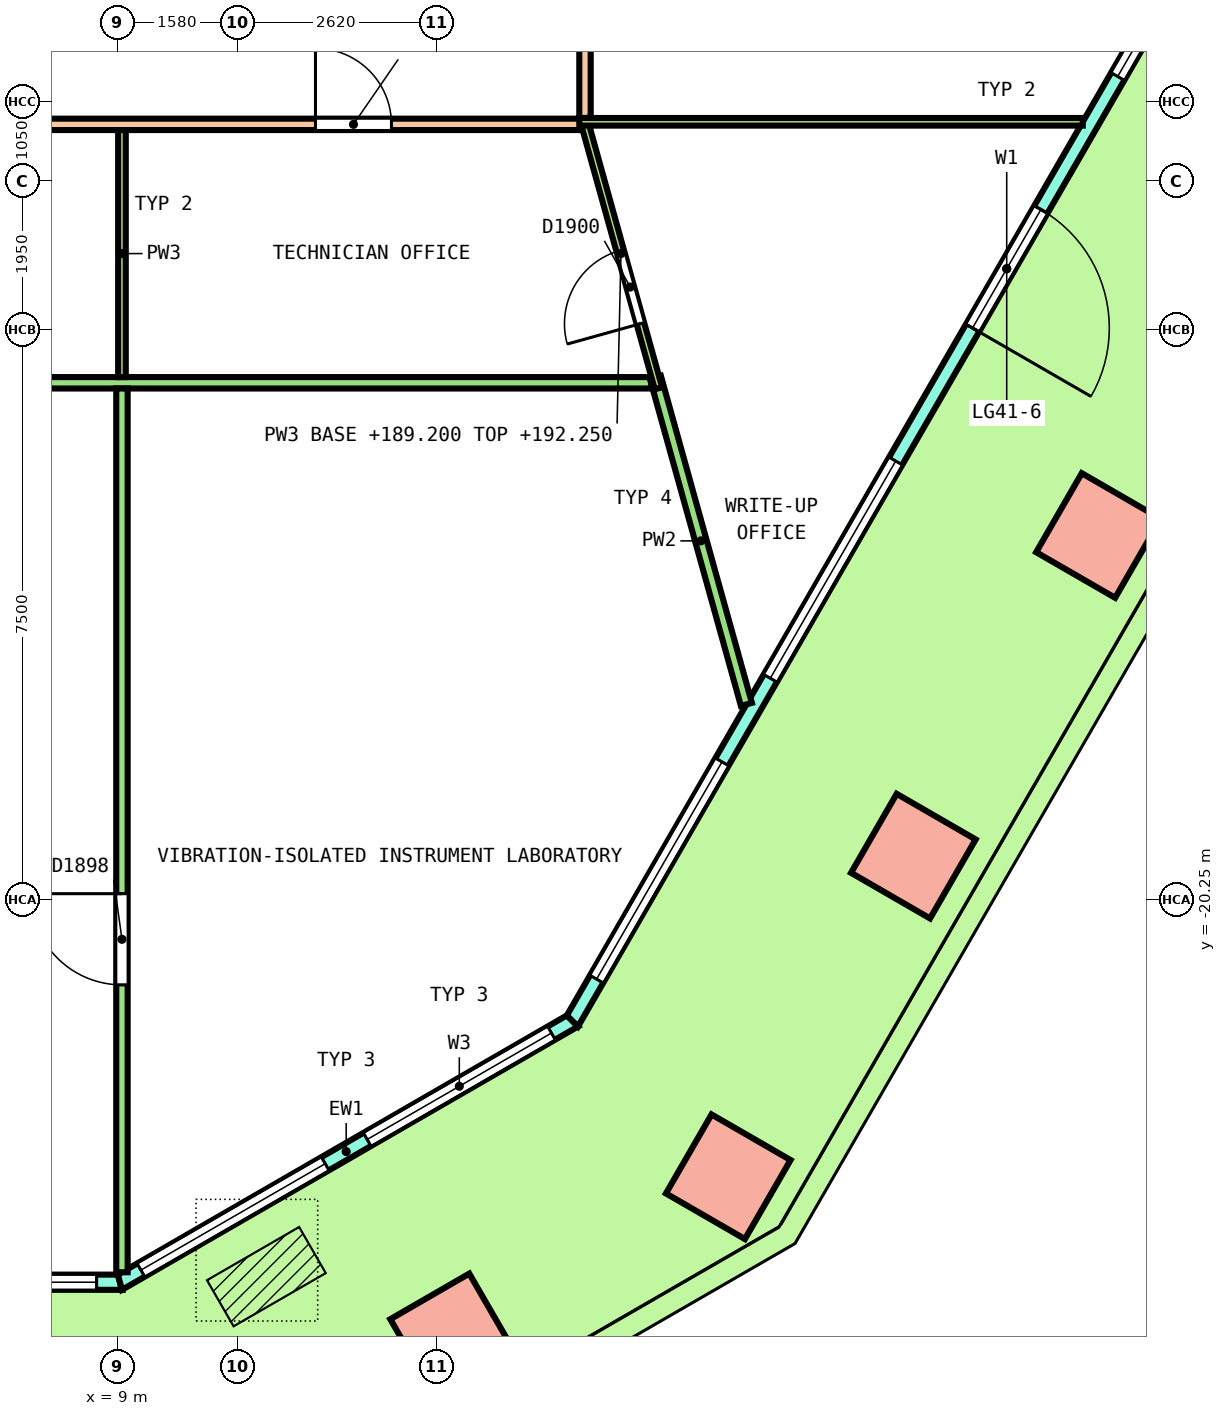
"""IFC4 building model, lengths in metres.
Left out: names, types, materials, properties, quantities, classifications, styles, units other than length and angle.
Written with IfcOpenShell. Run it as: python <this file> out.ifc"""

import sys

from ifc_helpers import new_model, si_unit, direction, frame, frame_2d, origin, origin_2d, place, context, subcontext, project, spatial, polyline, rectangle, outline, extrude, element, fill, save


model = new_model("IFC4")
c1 = context("Model", 3, precision=1e-05, world=origin(), true_north=direction((0.0, 1.0)))
c2 = subcontext(c1, "Body", "Model", "MODEL_VIEW")
j1 = project(units=[si_unit("LENGTHUNIT", "METRE"), si_unit("PLANEANGLEUNIT", "RADIAN")], contexts=[c1])
p1 = place(None, origin())
s1 = spatial("IfcSite", under=j1, at=p1, CompositionType="ELEMENT")
p2 = place(p1, origin())
s2 = spatial("IfcBuilding", under=s1, at=p2, CompositionType="ELEMENT")
p3 = place(p2, frame((0.0, 0.0, 189.2)))
s3 = spatial("IfcBuildingStorey", under=s2, at=p3, CompositionType="ELEMENT", Elevation=189.2)
for number, where, z_axis, x_axis in (
    (1, (13.408, -25.989, 0.0), (0.0, 0.0, 1.0), (0.866, 0.5, 0.0)),
    (2, (17.035, -23.895, 0.0), (0.0, 0.0, 1.0), (0.5, 0.866, 0.0)),
    (3, (19.47, -19.677, 0.0), (0.0, 0.0, 1.0), (0.5, 0.866, 0.0)),
    (4, (21.905, -15.459, 0.0), (0.0, 0.0, 1.0), (0.5, 0.866, 0.0)),
):
    element("IfcColumn", number, at=place(p3, frame(where, z_axis=z_axis, x_axis=x_axis)), inside=s3, PredefinedType="COLUMN", context=c2, shape_type="SweptSolid", body=[
        extrude(rectangle(XDim=1.2, YDim=1.2, at=origin_2d()), origin(), (0.0, 0.0, 1.0), 4.05),
    ])
p4 = place(p3, frame((-9.031, -25.283, 0.0), z_axis=(0.0, 0.0, 1.0), x_axis=(1.0, 0.0, 0.0)))
e5 = element("IfcWall", 5, at=p4, inside=s3, PredefinedType="SOLIDWALL", context=c2, shape_type="SweptSolid", body=[
    extrude(outline(polyline([(-0.027, -0.1), (0.979, -0.1), (1.986, -0.1), (2.992, -0.1), (3.999, -0.1), (5.005, -0.1), (6.012, -0.1), (7.018, -0.1), (8.025, -0.1), (9.031, -0.1), (10.038, -0.1), (11.044, -0.1), (12.051, -0.1), (13.057, -0.1), (14.063, -0.1), (15.07, -0.1), (16.076, -0.1), (17.083, -0.1), (18.089, -0.1), (18.036, 0.1), (17.035, 0.1), (16.035, 0.1), (15.034, 0.1), (14.034, 0.1), (13.033, 0.1), (12.033, 0.1), (11.032, 0.1), (10.032, 0.1), (9.031, 0.1), (8.031, 0.1), (7.03, 0.1), (6.03, 0.1), (5.029, 0.1), (4.029, 0.1), (3.028, 0.1), (2.028, 0.1), (1.027, 0.1), (0.027, 0.1), (-0.027, -0.1)])), origin(), (0.0, 0.0, 1.0), 4.1),
])
p5 = place(p4, frame((0.306, 0.0, 0.1)))
e6 = element("IfcOpeningElement", 6, at=p5, cuts=e5, PredefinedType="OPENING", context=c2, shape_type="SweptSolid", body=[
    extrude(rectangle(XDim=3.0, YDim=2.9, at=frame_2d((1.5, 1.45))), frame((0.0, 0.11, 0.0), z_axis=(0.0, -1.0, 0.0), x_axis=(1.0, 0.0, 0.0)), (0.0, 0.0, 1.0), 0.22),
])
p6 = place(p4, frame((3.919, 0.0, 0.1)))
e7 = element("IfcOpeningElement", 7, at=p6, cuts=e5, PredefinedType="OPENING", context=c2, shape_type="SweptSolid", body=[
    extrude(rectangle(XDim=3.0, YDim=2.9, at=frame_2d((1.5, 1.45))), frame((0.0, 0.11, 0.0), z_axis=(0.0, -1.0, 0.0), x_axis=(1.0, 0.0, 0.0)), (0.0, 0.0, 1.0), 0.22),
])
p7 = place(p4, frame((8.131, 0.0, 0.0)))
e8 = element("IfcOpeningElement", 8, at=p7, cuts=e5, PredefinedType="OPENING", context=c2, shape_type="SweptSolid", body=[
    extrude(rectangle(XDim=1.8, YDim=2.4, at=frame_2d((0.9, 1.2))), frame((0.0, 0.11, 0.0), z_axis=(0.0, -1.0, 0.0), x_axis=(1.0, 0.0, 0.0)), (0.0, 0.0, 1.0), 0.22),
])
p8 = place(p4, frame((8.131, 0.0, 2.55)))
e9 = element("IfcOpeningElement", 9, at=p8, cuts=e5, PredefinedType="OPENING", context=c2, shape_type="SweptSolid", body=[
    extrude(rectangle(XDim=1.8, YDim=0.45, at=frame_2d((0.9, 0.225))), frame((0.0, 0.11, 0.0), z_axis=(0.0, -1.0, 0.0), x_axis=(1.0, 0.0, 0.0)), (0.0, 0.0, 1.0), 0.22),
])
p9 = place(p4, frame((11.144, 0.0, 0.1)))
e10 = element("IfcOpeningElement", 10, at=p9, cuts=e5, PredefinedType="OPENING", context=c2, shape_type="SweptSolid", body=[
    extrude(rectangle(XDim=3.0, YDim=2.9, at=frame_2d((1.5, 1.45))), frame((0.0, 0.11, 0.0), z_axis=(0.0, -1.0, 0.0), x_axis=(1.0, 0.0, 0.0)), (0.0, 0.0, 1.0), 0.22),
])
p10 = place(p4, frame((14.756, 0.0, 0.1)))
e11 = element("IfcOpeningElement", 11, at=p10, cuts=e5, PredefinedType="OPENING", context=c2, shape_type="SweptSolid", body=[
    extrude(rectangle(XDim=3.0, YDim=2.9, at=frame_2d((1.5, 1.45))), frame((0.0, 0.11, 0.0), z_axis=(0.0, -1.0, 0.0), x_axis=(1.0, 0.0, 0.0)), (0.0, 0.0, 1.0), 0.22),
])
p11 = place(p3, frame((9.031, -25.283, 0.0), z_axis=(0.0, 0.0, 1.0), x_axis=(0.866029458321, 0.49999297727, 0.0)))
e12 = element("IfcWall", 12, at=p11, inside=s3, PredefinedType="SOLIDWALL", context=c2, shape_type="SweptSolid", body=[
    extrude(outline(polyline([(-0.027, -0.1), (1.128, -0.1), (2.282, -0.1), (3.437, -0.1), (4.592, -0.1), (5.747, -0.1), (6.901, -0.1), (6.848, 0.1), (5.711, 0.1), (4.574, 0.1), (3.437, 0.1), (2.301, 0.1), (1.164, 0.1), (0.027, 0.1), (-0.027, -0.1)])), origin(), (0.0, 0.0, 1.0), 4.1),
])
p12 = place(p11, frame((0.319, 0.0, 0.1)))
e13 = element("IfcOpeningElement", 13, at=p12, cuts=e12, PredefinedType="OPENING", context=c2, shape_type="SweptSolid", body=[
    extrude(rectangle(XDim=2.8, YDim=2.9, at=frame_2d((1.4, 1.45))), frame((0.0, 0.11, 0.0), z_axis=(0.0, -1.0, 0.0), x_axis=(1.0, 0.0, 0.0)), (0.0, 0.0, 1.0), 0.22),
])
p13 = place(p11, frame((3.756, 0.0, 0.1)))
e14 = element("IfcOpeningElement", 14, at=p13, cuts=e12, PredefinedType="OPENING", context=c2, shape_type="SweptSolid", body=[
    extrude(rectangle(XDim=2.8, YDim=2.9, at=frame_2d((1.4, 1.45))), frame((0.0, 0.11, 0.0), z_axis=(0.0, -1.0, 0.0), x_axis=(1.0, 0.0, 0.0)), (0.0, 0.0, 1.0), 0.22),
])
p14 = place(p3, frame((14.985, -21.845, 0.0), z_axis=(0.0, 0.0, 1.0), x_axis=(0.50000204422, 0.86602422355, 0.0)))
e15 = element("IfcWall", 15, at=p14, inside=s3, PredefinedType="SOLIDWALL", context=c2, shape_type="SweptSolid", body=[
    extrude(outline(polyline([(-0.027, -0.1), (1.014, -0.1), (2.055, -0.1), (3.097, -0.1), (4.138, -0.1), (5.179, -0.1), (6.22, -0.1), (7.261, -0.1), (8.303, -0.1), (9.344, -0.1), (10.385, -0.1), (11.426, -0.1), (12.468, -0.1), (13.509, -0.1), (14.55, -0.1), (15.591, -0.1), (16.632, -0.1), (17.673, -0.1), (18.715, -0.1), (19.756, -0.1), (20.797, -0.1), (21.838, -0.1), (22.879, -0.1), (22.826, 0.1), (21.789, 0.1), (20.753, 0.1), (19.717, 0.1), (18.68, 0.1), (17.644, 0.1), (16.608, 0.1), (15.572, 0.1), (14.535, 0.1), (13.499, 0.1), (12.463, 0.1), (11.426, 0.1), (10.39, 0.1), (9.354, 0.1), (8.317, 0.1), (7.281, 0.1), (6.245, 0.1), (5.208, 0.1), (4.172, 0.1), (3.136, 0.1), (2.099, 0.1), (1.063, 0.1), (0.027, 0.1), (-0.027, -0.1)])), origin(), (0.0, 0.0, 1.0), 4.1),
])
p15 = place(p14, frame((0.635, 0.0, 0.1)))
e16 = element("IfcOpeningElement", 16, at=p15, cuts=e15, PredefinedType="OPENING", context=c2, shape_type="SweptSolid", body=[
    extrude(rectangle(XDim=3.3, YDim=2.9, at=frame_2d((1.65, 1.45))), frame((0.0, 0.11, 0.0), z_axis=(0.0, -1.0, 0.0), x_axis=(1.0, 0.0, 0.0)), (0.0, 0.0, 1.0), 0.22),
])
p16 = place(p14, frame((5.206, 0.0, 0.1)))
e17 = element("IfcOpeningElement", 17, at=p16, cuts=e15, PredefinedType="OPENING", context=c2, shape_type="SweptSolid", body=[
    extrude(rectangle(XDim=3.3, YDim=2.9, at=frame_2d((1.65, 1.45))), frame((0.0, 0.11, 0.0), z_axis=(0.0, -1.0, 0.0), x_axis=(1.0, 0.0, 0.0)), (0.0, 0.0, 1.0), 0.22),
])
p17 = place(p14, frame((10.526, 0.0, 0.0)))
e18 = element("IfcOpeningElement", 18, at=p17, cuts=e15, PredefinedType="OPENING", context=c2, shape_type="SweptSolid", body=[
    extrude(rectangle(XDim=1.8, YDim=2.4, at=frame_2d((0.9, 1.2))), frame((0.0, 0.11, 0.0), z_axis=(0.0, -1.0, 0.0), x_axis=(1.0, 0.0, 0.0)), (0.0, 0.0, 1.0), 0.22),
])
p18 = place(p14, frame((10.526, 0.0, 2.55)))
e19 = element("IfcOpeningElement", 19, at=p18, cuts=e15, PredefinedType="OPENING", context=c2, shape_type="SweptSolid", body=[
    extrude(rectangle(XDim=1.8, YDim=0.45, at=frame_2d((0.9, 0.225))), frame((0.0, 0.11, 0.0), z_axis=(0.0, -1.0, 0.0), x_axis=(1.0, 0.0, 0.0)), (0.0, 0.0, 1.0), 0.22),
])
p19 = place(p14, frame((14.347, 0.0, 0.1)))
e20 = element("IfcOpeningElement", 20, at=p19, cuts=e15, PredefinedType="OPENING", context=c2, shape_type="SweptSolid", body=[
    extrude(rectangle(XDim=3.3, YDim=2.9, at=frame_2d((1.65, 1.45))), frame((0.0, 0.11, 0.0), z_axis=(0.0, -1.0, 0.0), x_axis=(1.0, 0.0, 0.0)), (0.0, 0.0, 1.0), 0.22),
])
p20 = place(p14, frame((18.917, 0.0, 0.1)))
e21 = element("IfcOpeningElement", 21, at=p20, cuts=e15, PredefinedType="OPENING", context=c2, shape_type="SweptSolid", body=[
    extrude(rectangle(XDim=3.3, YDim=2.9, at=frame_2d((1.65, 1.45))), frame((0.0, 0.11, 0.0), z_axis=(0.0, -1.0, 0.0), x_axis=(1.0, 0.0, 0.0)), (0.0, 0.0, 1.0), 0.22),
])
p21 = place(p3, frame((15.15, -9.966, 0.0), z_axis=(0.0, 0.0, 1.0), x_axis=(0.0, 1.0, 0.0)))
e22 = element("IfcWall", 22, at=p21, inside=s3, PredefinedType="PARTITIONING", context=c2, shape_type="SweptSolid", body=[
    extrude(rectangle(XDim=8.692, YDim=0.15, at=frame_2d((4.346, 0.0))), origin(), (0.0, 0.0, 1.0), 3.05),
])
p22 = place(p21, frame((1.434, 0.0, 0.0)))
e23 = element("IfcOpeningElement", 23, at=p22, cuts=e22, PredefinedType="OPENING", context=c2, shape_type="SweptSolid", body=[
    extrude(rectangle(XDim=1.0, YDim=2.1, at=frame_2d((0.5, 1.05))), frame((0.0, 0.085, 0.0), z_axis=(0.0, -1.0, 0.0), x_axis=(1.0, 0.0, 0.0)), (0.0, 0.0, 1.0), 0.17),
])
p23 = place(p3, frame((-15.225, -10.05, 0.0), z_axis=(0.0, 0.0, 1.0), x_axis=(1.0, 0.0, 0.0)))
e24 = element("IfcWall", 24, at=p23, inside=s3, PredefinedType="PARTITIONING", context=c2, shape_type="SweptSolid", body=[
    extrude(rectangle(XDim=30.325, YDim=0.15, at=frame_2d((15.163, 0.0))), origin(), (0.0, 0.0, 1.0), 3.05),
])
p24 = place(p23, frame((3.742, 0.0, 0.0)))
e25 = element("IfcOpeningElement", 25, at=p24, cuts=e24, PredefinedType="OPENING", context=c2, shape_type="SweptSolid", body=[
    extrude(rectangle(XDim=1.0, YDim=2.1, at=frame_2d((0.5, 1.05))), frame((0.0, 0.085, 0.0), z_axis=(0.0, -1.0, 0.0), x_axis=(1.0, 0.0, 0.0)), (0.0, 0.0, 1.0), 0.17),
])
p25 = place(p23, frame((12.193, 0.0, 0.0)))
e26 = element("IfcOpeningElement", 26, at=p25, cuts=e24, PredefinedType="OPENING", context=c2, shape_type="SweptSolid", body=[
    extrude(rectangle(XDim=1.2, YDim=2.1, at=frame_2d((0.6, 1.05))), frame((0.0, 0.085, 0.0), z_axis=(0.0, -1.0, 0.0), x_axis=(1.0, 0.0, 0.0)), (0.0, 0.0, 1.0), 0.17),
])
p26 = place(p23, frame((26.829, 0.0, 0.0)))
e27 = element("IfcOpeningElement", 27, at=p26, cuts=e24, PredefinedType="OPENING", context=c2, shape_type="SweptSolid", body=[
    extrude(rectangle(XDim=1.0, YDim=2.1, at=frame_2d((0.5, 1.05))), frame((0.0, 0.085, 0.0), z_axis=(0.0, -1.0, 0.0), x_axis=(1.0, 0.0, 0.0)), (0.0, 0.0, 1.0), 0.17),
])
p27 = place(p3, frame((-14.983, -13.45, 0.0), z_axis=(0.0, 0.0, 1.0), x_axis=(1.0, 0.0, 0.0)))
e28 = element("IfcWall", 28, at=p27, inside=s3, PredefinedType="PARTITIONING", context=c2, shape_type="SweptSolid", body=[
    extrude(rectangle(XDim=31.004, YDim=0.15, at=frame_2d((15.502, 0.0))), origin(), (0.0, 0.0, 1.0), 3.05),
])
p28 = place(p27, frame((1.3, 0.0, 0.0)))
e29 = element("IfcOpeningElement", 29, at=p28, cuts=e28, PredefinedType="OPENING", context=c2, shape_type="SweptSolid", body=[
    extrude(rectangle(XDim=1.2, YDim=2.1, at=frame_2d((0.6, 1.05))), frame((0.0, 0.085, 0.0), z_axis=(0.0, -1.0, 0.0), x_axis=(1.0, 0.0, 0.0)), (0.0, 0.0, 1.0), 0.17),
])
p29 = place(p3, frame((9.058, -25.152, 0.0), z_axis=(0.0, 0.0, 1.0), x_axis=(0.0, 1.0, 0.0)))
e30 = element("IfcWall", 30, at=p29, inside=s3, PredefinedType="PARTITIONING", context=c2, shape_type="SweptSolid", body=[
    extrude(rectangle(XDim=11.627, YDim=0.15, at=frame_2d((5.813, 0.0))), origin(), (0.0, 0.0, 1.0), 3.05),
])
p30 = place(p29, frame((3.781, 0.0, 0.0)))
e31 = element("IfcOpeningElement", 31, at=p30, cuts=e30, PredefinedType="OPENING", context=c2, shape_type="SweptSolid", body=[
    extrude(rectangle(XDim=1.2, YDim=2.1, at=frame_2d((0.6, 1.05))), frame((0.0, 0.085, 0.0), z_axis=(0.0, -1.0, 0.0), x_axis=(1.0, 0.0, 0.0)), (0.0, 0.0, 1.0), 0.17),
])
p31 = place(p3, frame((16.076, -13.378, 0.0), z_axis=(0.0, 0.0, 1.0), x_axis=(0.268117368294, -0.963386255257, 0.0)))
e32 = element("IfcWall", 32, at=p31, inside=s3, PredefinedType="PARTITIONING", context=c2, shape_type="SweptSolid", body=[
    extrude(rectangle(XDim=4.467, YDim=0.15, at=frame_2d((2.234, 0.0))), origin(), (0.0, 0.0, 1.0), 3.05),
])
p32 = place(p3, frame((9.058, -13.375, 0.0), z_axis=(0.0, 0.0, 1.0), x_axis=(0.0, 1.0, 0.0)))
e33 = element("IfcWall", 33, at=p32, inside=s3, PredefinedType="PARTITIONING", context=c2, shape_type="SweptSolid", body=[
    extrude(rectangle(XDim=3.25, YDim=0.1, at=frame_2d((1.625, 0.0))), origin(), (0.0, 0.0, 1.0), 3.05),
])
p33 = place(p3, frame((15.13, -9.978, 0.0), z_axis=(0.0, 0.0, 1.0), x_axis=(0.268088761136, -0.963394216379, 0.0)))
e34 = element("IfcWall", 34, at=p33, inside=s3, PredefinedType="PARTITIONING", context=c2, shape_type="SweptSolid", body=[
    extrude(rectangle(XDim=3.679, YDim=0.1, at=frame_2d((1.84, 0.0))), origin(), (0.0, 0.0, 1.0), 3.05),
])
p34 = place(p33, frame((1.797, 0.0, 0.0)))
e35 = element("IfcOpeningElement", 35, at=p34, cuts=e34, PredefinedType="OPENING", context=c2, shape_type="SweptSolid", body=[
    extrude(rectangle(XDim=1.0, YDim=2.1, at=frame_2d((0.5, 1.05))), frame((0.0, 0.06, 0.0), z_axis=(0.0, -1.0, 0.0), x_axis=(1.0, 0.0, 0.0)), (0.0, 0.0, 1.0), 0.12),
])
p35 = place(p3, frame((15.075, -10.016, 0.0), z_axis=(0.0, 0.0, 1.0), x_axis=(1.0, 0.0, 0.0)))
e36 = element("IfcWall", 36, at=p35, inside=s3, PredefinedType="PARTITIONING", context=c2, shape_type="SweptSolid", body=[
    extrude(rectangle(XDim=6.624, YDim=0.1, at=frame_2d((3.312, 0.0))), origin(), (0.0, 0.0, 1.0), 3.05),
])
p36 = place(p10, origin())
e37 = element("IfcWindow", 37, at=p36, inside=s3, PartitioningType="SINGLE_PANEL", PredefinedType="WINDOW", context=c2, shape_type="SweptSolid", body=[
    extrude(rectangle(XDim=3.0, YDim=2.9, at=frame_2d((1.5, 1.45))), frame((0.0, 0.03, 0.0), z_axis=(0.0, -1.0, 0.0), x_axis=(1.0, 0.0, 0.0)), (0.0, 0.0, 1.0), 0.06),
])
fill(e11, e37)
p37 = place(p12, origin())
e38 = element("IfcWindow", 38, at=p37, inside=s3, PartitioningType="SINGLE_PANEL", PredefinedType="WINDOW", context=c2, shape_type="SweptSolid", body=[
    extrude(rectangle(XDim=2.8, YDim=2.9, at=frame_2d((1.4, 1.45))), frame((0.0, 0.03, 0.0), z_axis=(0.0, -1.0, 0.0), x_axis=(1.0, 0.0, 0.0)), (0.0, 0.0, 1.0), 0.06),
])
fill(e13, e38)
p38 = place(p13, origin())
e39 = element("IfcWindow", 39, at=p38, inside=s3, PartitioningType="SINGLE_PANEL", PredefinedType="WINDOW", context=c2, shape_type="SweptSolid", body=[
    extrude(rectangle(XDim=2.8, YDim=2.9, at=frame_2d((1.4, 1.45))), frame((0.0, 0.03, 0.0), z_axis=(0.0, -1.0, 0.0), x_axis=(1.0, 0.0, 0.0)), (0.0, 0.0, 1.0), 0.06),
])
fill(e14, e39)
p39 = place(p15, origin())
e40 = element("IfcWindow", 40, at=p39, inside=s3, PartitioningType="SINGLE_PANEL", PredefinedType="WINDOW", context=c2, shape_type="SweptSolid", body=[
    extrude(rectangle(XDim=3.3, YDim=2.9, at=frame_2d((1.65, 1.45))), frame((0.0, 0.03, 0.0), z_axis=(0.0, -1.0, 0.0), x_axis=(1.0, 0.0, 0.0)), (0.0, 0.0, 1.0), 0.06),
])
fill(e16, e40)
p40 = place(p16, origin())
e41 = element("IfcWindow", 41, at=p40, inside=s3, PartitioningType="SINGLE_PANEL", PredefinedType="WINDOW", context=c2, shape_type="SweptSolid", body=[
    extrude(rectangle(XDim=3.3, YDim=2.9, at=frame_2d((1.65, 1.45))), frame((0.0, 0.03, 0.0), z_axis=(0.0, -1.0, 0.0), x_axis=(1.0, 0.0, 0.0)), (0.0, 0.0, 1.0), 0.06),
])
fill(e17, e41)
p41 = place(p17, origin())
e42 = element("IfcDoor", 42, at=p41, inside=s3, OperationType="DOUBLE_DOOR_SINGLE_SWING", PredefinedType="DOOR", context=c2, shape_type="SweptSolid", body=[
    extrude(rectangle(XDim=1.8, YDim=2.4, at=frame_2d((0.9, 1.2))), frame((0.0, 0.025, 0.0), z_axis=(0.0, -1.0, 0.0), x_axis=(1.0, 0.0, 0.0)), (0.0, 0.0, 1.0), 0.05),
])
fill(e18, e42)
p42 = place(p18, origin())
e43 = element("IfcWindow", 43, at=p42, inside=s3, PartitioningType="SINGLE_PANEL", PredefinedType="WINDOW", context=c2, shape_type="SweptSolid", body=[
    extrude(rectangle(XDim=1.8, YDim=0.45, at=frame_2d((0.9, 0.225))), frame((0.0, 0.03, 0.0), z_axis=(0.0, -1.0, 0.0), x_axis=(1.0, 0.0, 0.0)), (0.0, 0.0, 1.0), 0.06),
])
fill(e19, e43)
p43 = place(p19, origin())
e44 = element("IfcWindow", 44, at=p43, inside=s3, PartitioningType="SINGLE_PANEL", PredefinedType="WINDOW", context=c2, shape_type="SweptSolid", body=[
    extrude(rectangle(XDim=3.3, YDim=2.9, at=frame_2d((1.65, 1.45))), frame((0.0, 0.03, 0.0), z_axis=(0.0, -1.0, 0.0), x_axis=(1.0, 0.0, 0.0)), (0.0, 0.0, 1.0), 0.06),
])
fill(e20, e44)
p44 = place(p30, origin())
e45 = element("IfcDoor", 45, at=p44, inside=s3, OperationType="DOUBLE_DOOR_SINGLE_SWING", PredefinedType="DOOR", context=c2, shape_type="SweptSolid", body=[
    extrude(rectangle(XDim=1.2, YDim=2.1, at=frame_2d((0.6, 1.05))), frame((0.0, 0.025, 0.0), z_axis=(0.0, -1.0, 0.0), x_axis=(1.0, 0.0, 0.0)), (0.0, 0.0, 1.0), 0.05),
])
fill(e31, e45)
p45 = place(p26, origin())
e46 = element("IfcDoor", 46, at=p45, inside=s3, OperationType="SINGLE_SWING_LEFT", PredefinedType="DOOR", context=c2, shape_type="SweptSolid", body=[
    extrude(rectangle(XDim=1.0, YDim=2.1, at=frame_2d((0.5, 1.05))), frame((0.0, 0.025, 0.0), z_axis=(0.0, -1.0, 0.0), x_axis=(1.0, 0.0, 0.0)), (0.0, 0.0, 1.0), 0.05),
])
fill(e27, e46)
p46 = place(p34, origin())
e47 = element("IfcDoor", 47, at=p46, inside=s3, OperationType="SINGLE_SWING_RIGHT", PredefinedType="DOOR", context=c2, shape_type="SweptSolid", body=[
    extrude(rectangle(XDim=1.0, YDim=2.1, at=frame_2d((0.5, 1.05))), frame((0.0, 0.025, 0.0), z_axis=(0.0, -1.0, 0.0), x_axis=(1.0, 0.0, 0.0)), (0.0, 0.0, 1.0), 0.05),
])
fill(e35, e47)
save(model, sys.argv[1])
